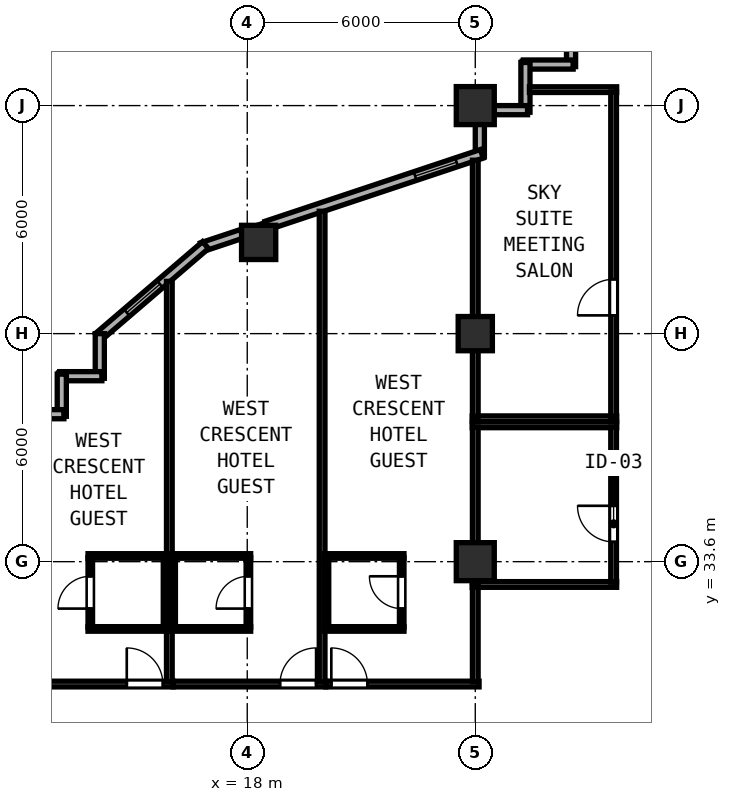
"""IFC4 building model, lengths in metres.
Left out: names, types, materials, properties, quantities, classifications, styles, units other than length and angle.
Written with IfcOpenShell. Run it as: python <this file> out.ifc"""

import sys

from ifc_helpers import new_model, si_unit, direction, frame, frame_2d, origin, origin_2d, place, context, subcontext, project, spatial, rectangle, hollow_rectangle, extrude, element, fill, save


model = new_model("IFC4")
c1 = context("Model", 3, precision=1e-05, world=origin(), true_north=direction((0.0, 1.0)))
c2 = subcontext(c1, "Body", "Model", "MODEL_VIEW")
j1 = project(units=[si_unit("LENGTHUNIT", "METRE"), si_unit("PLANEANGLEUNIT", "RADIAN")], contexts=[c1])
p1 = place(None, origin())
s1 = spatial("IfcSite", under=j1, at=p1, CompositionType="ELEMENT")
p2 = place(p1, origin())
s2 = spatial("IfcBuilding", under=s1, at=p2, CompositionType="ELEMENT")
p3 = place(p2, frame((0.0, 0.0, 121.2)))
s3 = spatial("IfcBuildingStorey", under=s2, at=p3, CompositionType="ELEMENT", Elevation=121.2)
for number, where, z_axis, x_axis in (
    (1, (24.0, 33.6, 0.0), (0.0, 0.0, 1.0), (1.0, 0.0, 0.0)),
    (2, (24.0, 45.6, 0.0), (0.0, 0.0, 1.0), (1.0, 0.0, 0.0)),
):
    element("IfcColumn", number, at=place(p3, frame(where, z_axis=z_axis, x_axis=x_axis)), inside=s3, PredefinedType="COLUMN", context=c2, shape_type="SweptSolid", body=[
        extrude(hollow_rectangle(XDim=1.0, YDim=1.0, WallThickness=0.038, at=origin_2d()), origin(), (0.0, 0.0, 1.0), 3.8),
    ])
for number, where, z_axis, x_axis in (
    (3, (24.0, 39.6, 0.0), (0.0, 0.0, 1.0), (1.0, 0.0, 0.0)),
    (4, (18.3, 42.0, 0.0), (0.0, 0.0, 1.0), (1.0, 0.0, 0.0)),
):
    element("IfcColumn", number, at=place(p3, frame(where, z_axis=z_axis, x_axis=x_axis)), inside=s3, PredefinedType="COLUMN", context=c2, shape_type="SweptSolid", body=[
        extrude(hollow_rectangle(XDim=0.9, YDim=0.9, WallThickness=0.034, at=origin_2d()), origin(), (0.0, 0.0, 1.0), 3.8),
    ])
p4 = place(p3, frame((26.52, 47.995, 0.0), z_axis=(0.0, 0.0, 1.0), x_axis=(0.0, -1.0, 0.0)))
e5 = element("IfcWall", 5, at=p4, inside=s3, PredefinedType="SOLIDWALL", context=c2, shape_type="SweptSolid", body=[
    extrude(rectangle(XDim=1.37, YDim=0.24, at=frame_2d((0.685, 0.0))), origin(), (0.0, 0.0, 1.0), 3.6),
])
for number, where, z_axis, x_axis in (
    (6, (26.575, 46.68, 0.0), (0.0, 0.0, 1.0), (-1.0, 0.0, 0.0)),
    (7, (25.32, 46.735, 0.0), (0.0, 0.0, 1.0), (0.0, -1.0, 0.0)),
):
    element("IfcWall", number, at=place(p3, frame(where, z_axis=z_axis, x_axis=x_axis)), inside=s3, PredefinedType="SOLIDWALL", context=c2, shape_type="SweptSolid", body=[
        extrude(rectangle(XDim=1.31, YDim=0.24, at=frame_2d((0.655, 0.0))), origin(), (0.0, 0.0, 1.0), 3.6),
    ])
p5 = place(p3, frame((25.375, 45.48, 0.0), z_axis=(0.0, 0.0, 1.0), x_axis=(-1.0, 0.0, 0.0)))
e8 = element("IfcWall", 8, at=p5, inside=s3, PredefinedType="SOLIDWALL", context=c2, shape_type="SweptSolid", body=[
    extrude(rectangle(XDim=0.883, YDim=0.24, at=frame_2d((0.441, 0.0))), origin(), (0.0, 0.0, 1.0), 3.6),
])
p6 = place(p3, frame((24.12, 45.108, 0.0), z_axis=(0.0, 0.0, 1.0), x_axis=(0.0, -1.0, 0.0)))
e9 = element("IfcWall", 9, at=p6, inside=s3, PredefinedType="SOLIDWALL", context=c2, shape_type="SweptSolid", body=[
    extrude(rectangle(XDim=0.849, YDim=0.24, at=frame_2d((0.425, 0.0))), origin(), (0.0, 0.0, 1.0), 3.145),
])
p7 = place(p3, frame((24.172, 44.331, 0.0), z_axis=(0.0, 0.0, 1.0), x_axis=(-0.948683298051, -0.316227766017, 0.0)))
e10 = element("IfcWall", 10, at=p7, inside=s3, PredefinedType="SOLIDWALL", context=c2, shape_type="SweptSolid", body=[
    extrude(rectangle(XDim=5.973, YDim=0.24, at=frame_2d((2.987, 0.0))), origin(), (0.0, 0.0, 1.0), 3.145),
])
p8 = place(p7, frame((0.7, 0.0, 0.85)))
e11 = element("IfcOpeningElement", 11, at=p8, cuts=e10, PredefinedType="OPENING", context=c2, shape_type="SweptSolid", body=[
    extrude(rectangle(XDim=1.15, YDim=1.8, at=frame_2d((0.575, 0.9))), frame((0.0, 0.13, 0.0), z_axis=(0.0, -1.0, 0.0), x_axis=(1.0, 0.0, 0.0)), (0.0, 0.0, 1.0), 0.26),
])
p9 = place(p3, frame((17.858, 42.226, 0.0), z_axis=(0.0, 0.0, 1.0), x_axis=(-0.948639166064, -0.316360131194, 0.0)))
e12 = element("IfcWall", 12, at=p9, inside=s3, PredefinedType="SOLIDWALL", context=c2, shape_type="SweptSolid", body=[
    extrude(rectangle(XDim=1.107, YDim=0.24, at=frame_2d((0.553, 0.0))), origin(), (0.0, 0.0, 1.0), 3.6),
])
p10 = place(p3, frame((16.902, 41.929, 0.0), z_axis=(0.0, 0.0, 1.0), x_axis=(-0.759275136126, -0.650769750112, 0.0)))
e13 = element("IfcWall", 13, at=p10, inside=s3, PredefinedType="SOLIDWALL", context=c2, shape_type="SweptSolid", body=[
    extrude(rectangle(XDim=3.719, YDim=0.24, at=frame_2d((1.86, 0.0))), origin(), (0.0, 0.0, 1.0), 3.6),
])
p11 = place(p10, frame((1.579, 0.0, 0.85)))
e14 = element("IfcOpeningElement", 14, at=p11, cuts=e13, PredefinedType="OPENING", context=c2, shape_type="SweptSolid", body=[
    extrude(rectangle(XDim=1.15, YDim=1.8, at=frame_2d((0.575, 0.9))), frame((0.0, 0.13, 0.0), z_axis=(0.0, -1.0, 0.0), x_axis=(1.0, 0.0, 0.0)), (0.0, 0.0, 1.0), 0.26),
])
p12 = place(p3, frame((14.12, 39.6, 0.0), z_axis=(0.0, 0.0, 1.0), x_axis=(0.0, -1.0, 0.0)))
e15 = element("IfcWall", 15, at=p12, inside=s3, PredefinedType="SOLIDWALL", context=c2, shape_type="SweptSolid", body=[
    extrude(rectangle(XDim=1.175, YDim=0.24, at=frame_2d((0.587, 0.0))), origin(), (0.0, 0.0, 1.0), 3.6),
])
p13 = place(p3, frame((14.175, 38.48, 0.0), z_axis=(0.0, 0.0, 1.0), x_axis=(-1.0, 0.0, 0.0)))
e16 = element("IfcWall", 16, at=p13, inside=s3, PredefinedType="SOLIDWALL", context=c2, shape_type="SweptSolid", body=[
    extrude(rectangle(XDim=1.11, YDim=0.24, at=frame_2d((0.555, 0.0))), origin(), (0.0, 0.0, 1.0), 3.6),
])
p14 = place(p3, frame((13.12, 38.535, 0.0), z_axis=(0.0, 0.0, 1.0), x_axis=(0.0, -1.0, 0.0)))
e17 = element("IfcWall", 17, at=p14, inside=s3, PredefinedType="SOLIDWALL", context=c2, shape_type="SweptSolid", body=[
    extrude(rectangle(XDim=1.11, YDim=0.24, at=frame_2d((0.555, 0.0))), origin(), (0.0, 0.0, 1.0), 3.6),
])
p15 = place(p3, frame((13.175, 37.48, 0.0), z_axis=(0.0, 0.0, 1.0), x_axis=(-1.0, 0.0, 0.0)))
e18 = element("IfcWall", 18, at=p15, inside=s3, PredefinedType="SOLIDWALL", context=c2, shape_type="SweptSolid", body=[
    extrude(rectangle(XDim=1.11, YDim=0.24, at=frame_2d((0.555, 0.0))), origin(), (0.0, 0.0, 1.0), 3.6),
])
for number, where, z_axis, x_axis in (
    (19, (23.92, 37.2, 0.0), (0.0, 0.0, 1.0), (1.0, 0.0, 0.0)),
    (20, (23.92, 33.0, 0.0), (0.0, 0.0, 1.0), (1.0, 0.0, 0.0)),
):
    element("IfcWall", number, at=place(p3, frame(where, z_axis=z_axis, x_axis=x_axis)), inside=s3, PredefinedType="PARTITIONING", context=c2, shape_type="SweptSolid", body=[
        extrude(rectangle(XDim=3.8, YDim=0.15, at=frame_2d((1.9, 0.0))), origin(), (0.0, 0.0, 1.0), 3.6),
    ])
p16 = place(p3, frame((24.0, 33.06, 0.0), z_axis=(0.0, 0.0, 1.0), x_axis=(0.0, 1.0, 0.0)))
e21 = element("IfcWall", 21, at=p16, inside=s3, PredefinedType="PARTITIONING", context=c2, shape_type="SweptSolid", body=[
    extrude(rectangle(XDim=4.08, YDim=0.15, at=frame_2d((2.04, 0.0))), origin(), (0.0, 0.0, 1.0), 3.145),
])
p17 = place(p3, frame((27.64, 33.06, 0.0), z_axis=(0.0, 0.0, 1.0), x_axis=(0.0, 1.0, 0.0)))
e22 = element("IfcWall", 22, at=p17, inside=s3, PredefinedType="PARTITIONING", context=c2, shape_type="SweptSolid", body=[
    extrude(rectangle(XDim=4.08, YDim=0.15, at=frame_2d((2.04, 0.0))), origin(), (0.0, 0.0, 1.0), 3.6),
])
p18 = place(p17, frame((2.01, 0.0, 0.0), z_axis=(0.0, 0.0, 1.0), x_axis=(-1.0, 0.0, 0.0)))
e23 = element("IfcOpeningElement", 23, at=p18, cuts=e22, PredefinedType="OPENING", context=c2, shape_type="SweptSolid", body=[
    extrude(rectangle(XDim=0.95, YDim=2.12, at=frame_2d((0.475, 1.06))), frame((0.0, 0.085, 0.0), z_axis=(0.0, -1.0, 0.0), x_axis=(1.0, 0.0, 0.0)), (0.0, 0.0, 1.0), 0.17),
])
p19 = place(p3, frame((25.425, 46.02, 0.0), z_axis=(0.0, 0.0, 1.0), x_axis=(1.0, 0.0, 0.0)))
e24 = element("IfcWall", 24, at=p19, inside=s3, PredefinedType="PARTITIONING", context=c2, shape_type="SweptSolid", body=[
    extrude(rectangle(XDim=2.295, YDim=0.15, at=frame_2d((1.147, 0.0))), origin(), (0.0, 0.0, 1.0), 3.6),
])
p20 = place(p3, frame((23.92, 37.36, 0.0), z_axis=(0.0, 0.0, 1.0), x_axis=(1.0, 0.0, 0.0)))
e25 = element("IfcWall", 25, at=p20, inside=s3, PredefinedType="PARTITIONING", context=c2, shape_type="SweptSolid", body=[
    extrude(rectangle(XDim=3.8, YDim=0.15, at=frame_2d((1.9, 0.0))), origin(), (0.0, 0.0, 1.0), 3.6),
])
p21 = place(p3, frame((24.0, 37.42, 0.0), z_axis=(0.0, 0.0, 1.0), x_axis=(0.0, 1.0, 0.0)))
e26 = element("IfcWall", 26, at=p21, inside=s3, PredefinedType="PARTITIONING", context=c2, shape_type="SweptSolid", body=[
    extrude(rectangle(XDim=6.743, YDim=0.15, at=frame_2d((3.372, 0.0))), origin(), (0.0, 0.0, 1.0), 3.145),
])
p22 = place(p3, frame((27.64, 37.42, 0.0), z_axis=(0.0, 0.0, 1.0), x_axis=(0.0, 1.0, 0.0)))
e27 = element("IfcWall", 27, at=p22, inside=s3, PredefinedType="PARTITIONING", context=c2, shape_type="SweptSolid", body=[
    extrude(rectangle(XDim=8.54, YDim=0.15, at=frame_2d((4.27, 0.0))), origin(), (0.0, 0.0, 1.0), 3.6),
])
p23 = place(p22, frame((3.61, 0.0, 0.0), z_axis=(0.0, 0.0, 1.0), x_axis=(-1.0, 0.0, 0.0)))
e28 = element("IfcOpeningElement", 28, at=p23, cuts=e27, PredefinedType="OPENING", context=c2, shape_type="SweptSolid", body=[
    extrude(rectangle(XDim=0.95, YDim=2.12, at=frame_2d((0.475, 1.06))), frame((0.0, 0.085, 0.0), z_axis=(0.0, -1.0, 0.0), x_axis=(1.0, 0.0, 0.0)), (0.0, 0.0, 1.0), 0.17),
])
p24 = place(p3, frame((11.7, 30.38, 0.0), z_axis=(0.0, 0.0, 1.0), x_axis=(1.0, 0.0, 0.0)))
e29 = element("IfcWall", 29, at=p24, inside=s3, PredefinedType="PARTITIONING", context=c2, shape_type="SweptSolid", body=[
    extrude(rectangle(XDim=4.35, YDim=0.15, at=frame_2d((2.175, 0.0))), origin(), (0.0, 0.0, 1.0), 3.6),
])
p25 = place(p24, frame((3.13, 0.0, 0.0)))
e30 = element("IfcOpeningElement", 30, at=p25, cuts=e29, PredefinedType="OPENING", context=c2, shape_type="SweptSolid", body=[
    extrude(rectangle(XDim=0.95, YDim=2.15, at=frame_2d((0.475, 1.075))), frame((0.0, 0.085, 0.0), z_axis=(0.0, -1.0, 0.0), x_axis=(1.0, 0.0, 0.0)), (0.0, 0.0, 1.0), 0.17),
])
p26 = place(p3, frame((15.95, 30.44, 0.0), z_axis=(0.0, 0.0, 1.0), x_axis=(0.0, 1.0, 0.0)))
e31 = element("IfcWall", 31, at=p26, inside=s3, PredefinedType="PARTITIONING", context=c2, shape_type="SweptSolid", body=[
    extrude(rectangle(XDim=10.535, YDim=0.15, at=frame_2d((5.268, 0.0))), origin(), (0.0, 0.0, 1.0), 3.6),
])
for number, where, z_axis, x_axis in (
    (32, (13.81, 33.75, 0.0), (0.0, 0.0, 1.0), (1.0, 0.0, 0.0)),
    (33, (13.81, 31.83, 0.0), (0.0, 0.0, 1.0), (1.0, 0.0, 0.0)),
):
    element("IfcWall", number, at=place(p3, frame(where, z_axis=z_axis, x_axis=x_axis)), inside=s3, PredefinedType="PARTITIONING", context=c2, shape_type="SweptSolid", body=[
        extrude(rectangle(XDim=2.08, YDim=0.12, at=frame_2d((1.04, 0.0))), origin(), (0.0, 0.0, 1.0), 3.6),
    ])
p27 = place(p3, frame((13.87, 31.875, 0.0), z_axis=(0.0, 0.0, 1.0), x_axis=(0.0, 1.0, 0.0)))
e34 = element("IfcWall", 34, at=p27, inside=s3, PredefinedType="PARTITIONING", context=c2, shape_type="SweptSolid", body=[
    extrude(rectangle(XDim=1.83, YDim=0.12, at=frame_2d((0.915, 0.0))), origin(), (0.0, 0.0, 1.0), 3.6),
])
p28 = place(p27, frame((1.34, 0.0, 0.0), z_axis=(0.0, 0.0, 1.0), x_axis=(-1.0, 0.0, 0.0)))
e35 = element("IfcOpeningElement", 35, at=p28, cuts=e34, PredefinedType="OPENING", context=c2, shape_type="SweptSolid", body=[
    extrude(rectangle(XDim=0.85, YDim=2.1, at=frame_2d((0.425, 1.05))), frame((0.0, 0.07, 0.0), z_axis=(0.0, -1.0, 0.0), x_axis=(1.0, 0.0, 0.0)), (0.0, 0.0, 1.0), 0.14),
])
p29 = place(p3, frame((15.85, 31.875, 0.0), z_axis=(0.0, 0.0, 1.0), x_axis=(0.0, 1.0, 0.0)))
e36 = element("IfcWall", 36, at=p29, inside=s3, PredefinedType="PARTITIONING", context=c2, shape_type="SweptSolid", body=[
    extrude(rectangle(XDim=1.83, YDim=0.12, at=frame_2d((0.915, 0.0))), origin(), (0.0, 0.0, 1.0), 3.6),
])
p30 = place(p3, frame((16.052, 30.38, 0.0), z_axis=(0.0, 0.0, 1.0), x_axis=(1.0, 0.0, 0.0)))
e37 = element("IfcWall", 37, at=p30, inside=s3, PredefinedType="PARTITIONING", context=c2, shape_type="SweptSolid", body=[
    extrude(rectangle(XDim=4.018, YDim=0.15, at=frame_2d((2.009, 0.0))), origin(), (0.0, 0.0, 1.0), 3.6),
])
p31 = place(p30, frame((2.81, 0.0, 0.0)))
e38 = element("IfcOpeningElement", 38, at=p31, cuts=e37, PredefinedType="OPENING", context=c2, shape_type="SweptSolid", body=[
    extrude(rectangle(XDim=0.95, YDim=2.15, at=frame_2d((0.475, 1.075))), frame((0.0, 0.085, 0.0), z_axis=(0.0, -1.0, 0.0), x_axis=(1.0, 0.0, 0.0)), (0.0, 0.0, 1.0), 0.17),
])
p32 = place(p3, frame((19.97, 30.44, 0.0), z_axis=(0.0, 0.0, 1.0), x_axis=(0.0, 1.0, 0.0)))
e39 = element("IfcWall", 39, at=p32, inside=s3, PredefinedType="PARTITIONING", context=c2, shape_type="SweptSolid", body=[
    extrude(rectangle(XDim=12.38, YDim=0.15, at=frame_2d((6.19, 0.0))), origin(), (0.0, 0.0, 1.0), 3.6),
])
for number, where, z_axis, x_axis in (
    (40, (16.01, 33.75, 0.0), (0.0, 0.0, 1.0), (1.0, 0.0, 0.0)),
    (41, (16.01, 31.83, 0.0), (0.0, 0.0, 1.0), (1.0, 0.0, 0.0)),
):
    element("IfcWall", number, at=place(p3, frame(where, z_axis=z_axis, x_axis=x_axis)), inside=s3, PredefinedType="PARTITIONING", context=c2, shape_type="SweptSolid", body=[
        extrude(rectangle(XDim=2.08, YDim=0.12, at=frame_2d((1.04, 0.0))), origin(), (0.0, 0.0, 1.0), 3.6),
    ])
p33 = place(p3, frame((16.05, 31.875, 0.0), z_axis=(0.0, 0.0, 1.0), x_axis=(0.0, 1.0, 0.0)))
e42 = element("IfcWall", 42, at=p33, inside=s3, PredefinedType="PARTITIONING", context=c2, shape_type="SweptSolid", body=[
    extrude(rectangle(XDim=1.83, YDim=0.12, at=frame_2d((0.915, 0.0))), origin(), (0.0, 0.0, 1.0), 3.6),
])
p34 = place(p3, frame((18.03, 31.875, 0.0), z_axis=(0.0, 0.0, 1.0), x_axis=(0.0, 1.0, 0.0)))
e43 = element("IfcWall", 43, at=p34, inside=s3, PredefinedType="PARTITIONING", context=c2, shape_type="SweptSolid", body=[
    extrude(rectangle(XDim=1.83, YDim=0.12, at=frame_2d((0.915, 0.0))), origin(), (0.0, 0.0, 1.0), 3.6),
])
p35 = place(p34, frame((0.49, 0.0, 0.0)))
e44 = element("IfcOpeningElement", 44, at=p35, cuts=e43, PredefinedType="OPENING", context=c2, shape_type="SweptSolid", body=[
    extrude(rectangle(XDim=0.85, YDim=2.1, at=frame_2d((0.425, 1.05))), frame((0.0, 0.07, 0.0), z_axis=(0.0, -1.0, 0.0), x_axis=(1.0, 0.0, 0.0)), (0.0, 0.0, 1.0), 0.14),
])
p36 = place(p3, frame((20.072, 30.38, 0.0), z_axis=(0.0, 0.0, 1.0), x_axis=(1.0, 0.0, 0.0)))
e45 = element("IfcWall", 45, at=p36, inside=s3, PredefinedType="PARTITIONING", context=c2, shape_type="SweptSolid", body=[
    extrude(rectangle(XDim=4.028, YDim=0.15, at=frame_2d((2.014, 0.0))), origin(), (0.0, 0.0, 1.0), 3.6),
])
p37 = place(p36, frame((0.14, 0.0, 0.0)))
e46 = element("IfcOpeningElement", 46, at=p37, cuts=e45, PredefinedType="OPENING", context=c2, shape_type="SweptSolid", body=[
    extrude(rectangle(XDim=0.95, YDim=2.15, at=frame_2d((0.475, 1.075))), frame((0.0, 0.085, 0.0), z_axis=(0.0, -1.0, 0.0), x_axis=(1.0, 0.0, 0.0)), (0.0, 0.0, 1.0), 0.17),
])
p38 = place(p3, frame((24.0, 30.44, 0.0), z_axis=(0.0, 0.0, 1.0), x_axis=(0.0, 1.0, 0.0)))
e47 = element("IfcWall", 47, at=p38, inside=s3, PredefinedType="PARTITIONING", context=c2, shape_type="SweptSolid", body=[
    extrude(rectangle(XDim=2.5, YDim=0.15, at=frame_2d((1.25, 0.0))), origin(), (0.0, 0.0, 1.0), 3.145),
])
for number, where, z_axis, x_axis in (
    (48, (20.03, 33.75, 0.0), (0.0, 0.0, 1.0), (1.0, 0.0, 0.0)),
    (49, (20.03, 31.83, 0.0), (0.0, 0.0, 1.0), (1.0, 0.0, 0.0)),
):
    element("IfcWall", number, at=place(p3, frame(where, z_axis=z_axis, x_axis=x_axis)), inside=s3, PredefinedType="PARTITIONING", context=c2, shape_type="SweptSolid", body=[
        extrude(rectangle(XDim=2.094, YDim=0.12, at=frame_2d((1.047, 0.0))), origin(), (0.0, 0.0, 1.0), 3.6),
    ])
p39 = place(p3, frame((20.084, 31.875, 0.0), z_axis=(0.0, 0.0, 1.0), x_axis=(0.0, 1.0, 0.0)))
e50 = element("IfcWall", 50, at=p39, inside=s3, PredefinedType="PARTITIONING", context=c2, shape_type="SweptSolid", body=[
    extrude(rectangle(XDim=1.83, YDim=0.12, at=frame_2d((0.915, 0.0))), origin(), (0.0, 0.0, 1.0), 3.6),
])
p40 = place(p3, frame((22.064, 31.875, 0.0), z_axis=(0.0, 0.0, 1.0), x_axis=(0.0, 1.0, 0.0)))
e51 = element("IfcWall", 51, at=p40, inside=s3, PredefinedType="PARTITIONING", context=c2, shape_type="SweptSolid", body=[
    extrude(rectangle(XDim=1.83, YDim=0.12, at=frame_2d((0.915, 0.0))), origin(), (0.0, 0.0, 1.0), 3.6),
])
p41 = place(p40, frame((0.49, 0.0, 0.0)))
e52 = element("IfcOpeningElement", 52, at=p41, cuts=e51, PredefinedType="OPENING", context=c2, shape_type="SweptSolid", body=[
    extrude(rectangle(XDim=0.85, YDim=2.1, at=frame_2d((0.425, 1.05))), frame((0.0, 0.07, 0.0), z_axis=(0.0, -1.0, 0.0), x_axis=(1.0, 0.0, 0.0)), (0.0, 0.0, 1.0), 0.14),
])
p42 = place(p8, origin())
e53 = element("IfcWindow", 53, at=p42, inside=s3, PartitioningType="SINGLE_PANEL", PredefinedType="WINDOW", context=c2, shape_type="SweptSolid", body=[
    extrude(rectangle(XDim=1.15, YDim=1.8, at=frame_2d((0.575, 0.9))), frame((0.0, 0.03, 0.0), z_axis=(0.0, -1.0, 0.0), x_axis=(1.0, 0.0, 0.0)), (0.0, 0.0, 1.0), 0.06),
])
fill(e11, e53)
p43 = place(p11, origin())
e54 = element("IfcWindow", 54, at=p43, inside=s3, PartitioningType="SINGLE_PANEL", PredefinedType="WINDOW", context=c2, shape_type="SweptSolid", body=[
    extrude(rectangle(XDim=1.15, YDim=1.8, at=frame_2d((0.575, 0.9))), frame((0.0, 0.03, 0.0), z_axis=(0.0, -1.0, 0.0), x_axis=(1.0, 0.0, 0.0)), (0.0, 0.0, 1.0), 0.06),
])
fill(e14, e54)
p44 = place(p18, origin())
e55 = element("IfcDoor", 55, at=p44, inside=s3, OperationType="SINGLE_SWING_LEFT", PredefinedType="DOOR", context=c2, shape_type="SweptSolid", body=[
    extrude(rectangle(XDim=0.95, YDim=2.12, at=frame_2d((0.475, 1.06))), frame((0.0, 0.025, 0.0), z_axis=(0.0, -1.0, 0.0), x_axis=(1.0, 0.0, 0.0)), (0.0, 0.0, 1.0), 0.05),
])
fill(e23, e55)
p45 = place(p23, origin())
e56 = element("IfcDoor", 56, at=p45, inside=s3, OperationType="SINGLE_SWING_RIGHT", PredefinedType="DOOR", context=c2, shape_type="SweptSolid", body=[
    extrude(rectangle(XDim=0.95, YDim=2.12, at=frame_2d((0.475, 1.06))), frame((0.0, 0.025, 0.0), z_axis=(0.0, -1.0, 0.0), x_axis=(1.0, 0.0, 0.0)), (0.0, 0.0, 1.0), 0.05),
])
fill(e28, e56)
p46 = place(p25, origin())
e57 = element("IfcDoor", 57, at=p46, inside=s3, OperationType="SINGLE_SWING_LEFT", PredefinedType="DOOR", context=c2, shape_type="SweptSolid", body=[
    extrude(rectangle(XDim=0.95, YDim=2.15, at=frame_2d((0.475, 1.075))), frame((0.0, 0.025, 0.0), z_axis=(0.0, -1.0, 0.0), x_axis=(1.0, 0.0, 0.0)), (0.0, 0.0, 1.0), 0.05),
])
fill(e30, e57)
p47 = place(p28, origin())
e58 = element("IfcDoor", 58, at=p47, inside=s3, OperationType="SINGLE_SWING_RIGHT", PredefinedType="DOOR", context=c2, shape_type="SweptSolid", body=[
    extrude(rectangle(XDim=0.85, YDim=2.1, at=frame_2d((0.425, 1.05))), frame((0.0, 0.025, 0.0), z_axis=(0.0, -1.0, 0.0), x_axis=(1.0, 0.0, 0.0)), (0.0, 0.0, 1.0), 0.05),
])
fill(e35, e58)
p48 = place(p31, origin())
e59 = element("IfcDoor", 59, at=p48, inside=s3, OperationType="SINGLE_SWING_RIGHT", PredefinedType="DOOR", context=c2, shape_type="SweptSolid", body=[
    extrude(rectangle(XDim=0.95, YDim=2.15, at=frame_2d((0.475, 1.075))), frame((0.0, 0.025, 0.0), z_axis=(0.0, -1.0, 0.0), x_axis=(1.0, 0.0, 0.0)), (0.0, 0.0, 1.0), 0.05),
])
fill(e38, e59)
p49 = place(p35, origin())
e60 = element("IfcDoor", 60, at=p49, inside=s3, OperationType="SINGLE_SWING_LEFT", PredefinedType="DOOR", context=c2, shape_type="SweptSolid", body=[
    extrude(rectangle(XDim=0.85, YDim=2.1, at=frame_2d((0.425, 1.05))), frame((0.0, 0.025, 0.0), z_axis=(0.0, -1.0, 0.0), x_axis=(1.0, 0.0, 0.0)), (0.0, 0.0, 1.0), 0.05),
])
fill(e44, e60)
p50 = place(p37, origin())
e61 = element("IfcDoor", 61, at=p50, inside=s3, OperationType="SINGLE_SWING_LEFT", PredefinedType="DOOR", context=c2, shape_type="SweptSolid", body=[
    extrude(rectangle(XDim=0.95, YDim=2.15, at=frame_2d((0.475, 1.075))), frame((0.0, 0.025, 0.0), z_axis=(0.0, -1.0, 0.0), x_axis=(1.0, 0.0, 0.0)), (0.0, 0.0, 1.0), 0.05),
])
fill(e46, e61)
p51 = place(p41, origin())
e62 = element("IfcDoor", 62, at=p51, inside=s3, OperationType="SINGLE_SWING_RIGHT", PredefinedType="DOOR", context=c2, shape_type="SweptSolid", body=[
    extrude(rectangle(XDim=0.85, YDim=2.1, at=frame_2d((0.425, 1.05))), frame((0.0, 0.025, 0.0), z_axis=(0.0, -1.0, 0.0), x_axis=(1.0, 0.0, 0.0)), (0.0, 0.0, 1.0), 0.05),
])
fill(e52, e62)
save(model, sys.argv[1])
